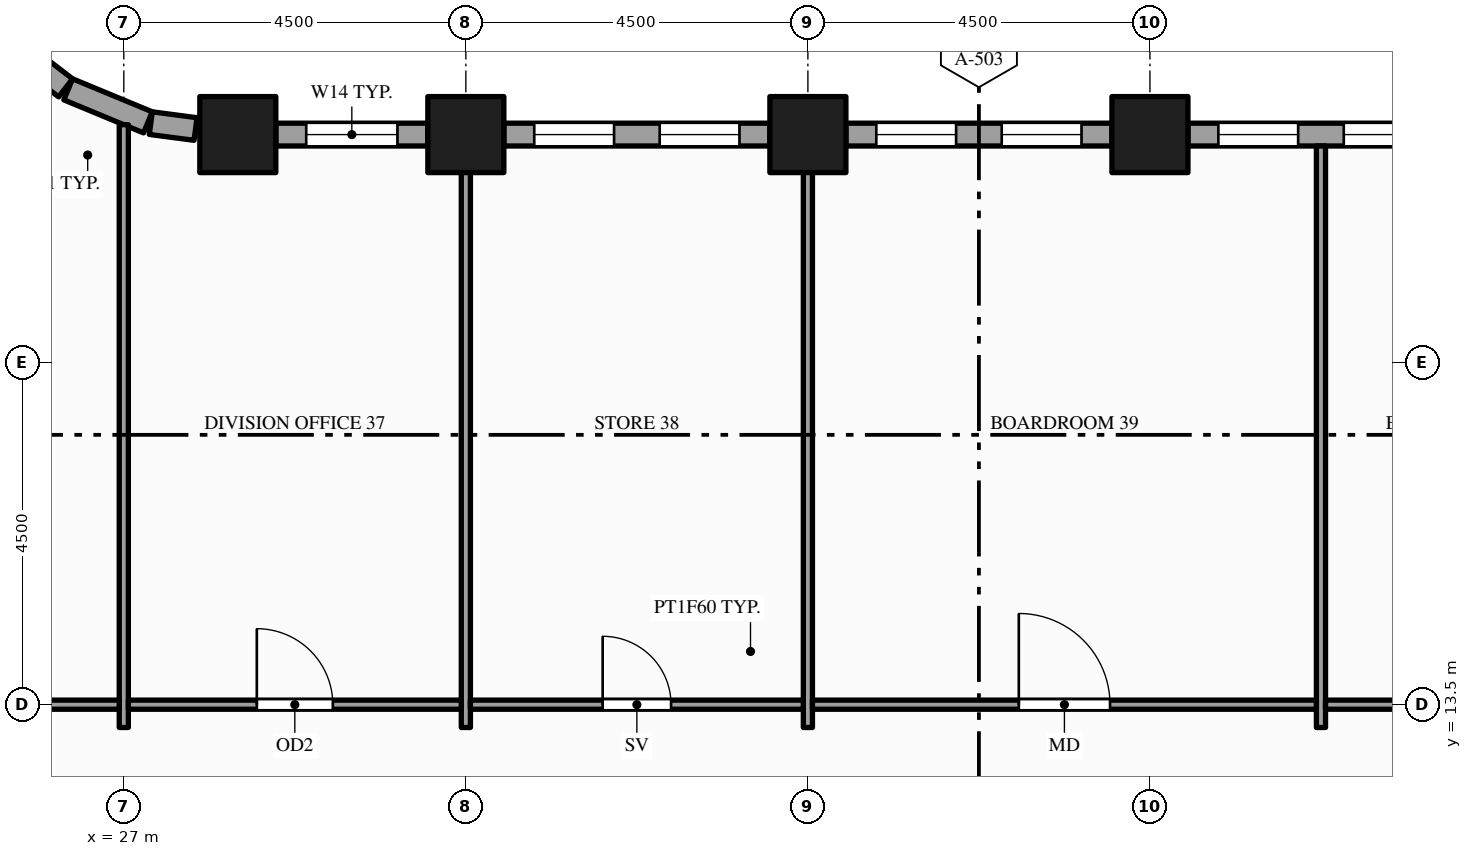
"""IFC4 building model, lengths in metres.
Left out: names, types, materials, properties, quantities, classifications, styles, units other than length and angle.
Written with IfcOpenShell. Run it as: python <this file> out.ifc"""

import sys

from ifc_helpers import new_model, si_unit, direction, frame, frame_2d, origin, origin_2d, place, context, subcontext, project, spatial, rectangle, hollow_rectangle, extrude, element, fill, save


model = new_model("IFC4")
c1 = context("Model", 3, precision=1e-05, world=origin(), true_north=direction((0.0, 1.0)))
c2 = subcontext(c1, "Body", "Model", "MODEL_VIEW")
j1 = project(units=[si_unit("LENGTHUNIT", "METRE"), si_unit("PLANEANGLEUNIT", "RADIAN")], contexts=[c1])
p1 = place(None, origin())
s1 = spatial("IfcSite", under=j1, at=p1, CompositionType="ELEMENT")
p2 = place(p1, origin())
s2 = spatial("IfcBuilding", under=s1, at=p2, CompositionType="ELEMENT")
p3 = place(p2, frame((0.0, 0.0, 83.0)))
s3 = spatial("IfcBuildingStorey", under=s2, at=p3, CompositionType="ELEMENT", Elevation=83.0)
for number, where, z_axis, x_axis in (
    (1, (28.5, 21.0, -0.15), (0.0, 0.0, 1.0), (1.0, 0.0, 0.0)),
    (2, (31.5, 21.0, -0.15), (0.0, 0.0, 1.0), (1.0, 0.0, 0.0)),
    (3, (36.0, 21.0, -0.15), (0.0, 0.0, 1.0), (1.0, 0.0, 0.0)),
    (4, (40.5, 21.0, -0.15), (0.0, 0.0, 1.0), (1.0, 0.0, 0.0)),
):
    element("IfcColumn", number, at=place(p3, frame(where, z_axis=z_axis, x_axis=x_axis)), inside=s3, PredefinedType="COLUMN", context=c2, shape_type="SweptSolid", body=[
        extrude(hollow_rectangle(XDim=1.0, YDim=1.0, WallThickness=0.05, at=origin_2d()), origin(), (0.0, 0.0, 1.0), 4.0),
    ])
p4 = place(p3, frame((44.5, 21.0, 0.0), z_axis=(0.0, 0.0, 1.0), x_axis=(-1.0, 0.0, 0.0)))
e5 = element("IfcWall", 5, at=p4, inside=s3, PredefinedType="STANDARD", context=c2, shape_type="SweptSolid", body=[
    extrude(rectangle(XDim=3.5, YDim=0.3, at=frame_2d((1.75, 0.0))), origin(), (0.0, 0.0, 1.0), 3.154),
])
p5 = place(p4, frame((0.4, 0.0, 0.9)))
e6 = element("IfcOpeningElement", 6, at=p5, cuts=e5, PredefinedType="OPENING", context=c2, shape_type="SweptSolid", body=[
    extrude(rectangle(XDim=1.05, YDim=2.0, at=frame_2d((0.525, 1.0))), frame((0.0, 0.16, 0.0), z_axis=(0.0, -1.0, 0.0), x_axis=(1.0, 0.0, 0.0)), (0.0, 0.0, 1.0), 0.32),
])
p6 = place(p4, frame((2.05, 0.0, 0.9)))
e7 = element("IfcOpeningElement", 7, at=p6, cuts=e5, PredefinedType="OPENING", context=c2, shape_type="SweptSolid", body=[
    extrude(rectangle(XDim=1.05, YDim=2.0, at=frame_2d((0.525, 1.0))), frame((0.0, 0.16, 0.0), z_axis=(0.0, -1.0, 0.0), x_axis=(1.0, 0.0, 0.0)), (0.0, 0.0, 1.0), 0.32),
])
p7 = place(p3, frame((40.0, 21.0, 0.0), z_axis=(0.0, 0.0, 1.0), x_axis=(-1.0, 0.0, 0.0)))
e8 = element("IfcWall", 8, at=p7, inside=s3, PredefinedType="STANDARD", context=c2, shape_type="SweptSolid", body=[
    extrude(rectangle(XDim=3.5, YDim=0.3, at=frame_2d((1.75, 0.0))), origin(), (0.0, 0.0, 1.0), 3.154),
])
p8 = place(p7, frame((0.4, 0.0, 0.9)))
e9 = element("IfcOpeningElement", 9, at=p8, cuts=e8, PredefinedType="OPENING", context=c2, shape_type="SweptSolid", body=[
    extrude(rectangle(XDim=1.05, YDim=2.0, at=frame_2d((0.525, 1.0))), frame((0.0, 0.16, 0.0), z_axis=(0.0, -1.0, 0.0), x_axis=(1.0, 0.0, 0.0)), (0.0, 0.0, 1.0), 0.32),
])
p9 = place(p7, frame((2.05, 0.0, 0.9)))
e10 = element("IfcOpeningElement", 10, at=p9, cuts=e8, PredefinedType="OPENING", context=c2, shape_type="SweptSolid", body=[
    extrude(rectangle(XDim=1.05, YDim=2.0, at=frame_2d((0.525, 1.0))), frame((0.0, 0.16, 0.0), z_axis=(0.0, -1.0, 0.0), x_axis=(1.0, 0.0, 0.0)), (0.0, 0.0, 1.0), 0.32),
])
p10 = place(p3, frame((35.5, 21.0, 0.0), z_axis=(0.0, 0.0, 1.0), x_axis=(-1.0, 0.0, 0.0)))
e11 = element("IfcWall", 11, at=p10, inside=s3, PredefinedType="STANDARD", context=c2, shape_type="SweptSolid", body=[
    extrude(rectangle(XDim=3.5, YDim=0.3, at=frame_2d((1.75, 0.0))), origin(), (0.0, 0.0, 1.0), 3.154),
])
p11 = place(p10, frame((0.4, 0.0, 0.9)))
e12 = element("IfcOpeningElement", 12, at=p11, cuts=e11, PredefinedType="OPENING", context=c2, shape_type="SweptSolid", body=[
    extrude(rectangle(XDim=1.05, YDim=2.0, at=frame_2d((0.525, 1.0))), frame((0.0, 0.16, 0.0), z_axis=(0.0, -1.0, 0.0), x_axis=(1.0, 0.0, 0.0)), (0.0, 0.0, 1.0), 0.32),
])
p12 = place(p10, frame((2.05, 0.0, 0.9)))
e13 = element("IfcOpeningElement", 13, at=p12, cuts=e11, PredefinedType="OPENING", context=c2, shape_type="SweptSolid", body=[
    extrude(rectangle(XDim=1.05, YDim=2.0, at=frame_2d((0.525, 1.0))), frame((0.0, 0.16, 0.0), z_axis=(0.0, -1.0, 0.0), x_axis=(1.0, 0.0, 0.0)), (0.0, 0.0, 1.0), 0.32),
])
p13 = place(p3, frame((31.0, 21.0, 0.0), z_axis=(0.0, 0.0, 1.0), x_axis=(-1.0, 0.0, 0.0)))
e14 = element("IfcWall", 14, at=p13, inside=s3, PredefinedType="STANDARD", context=c2, shape_type="SweptSolid", body=[
    extrude(rectangle(XDim=2.0, YDim=0.3, at=frame_2d((1.0, 0.0))), origin(), (0.0, 0.0, 1.0), 3.154),
])
p14 = place(p13, frame((0.4, 0.0, 0.9)))
e15 = element("IfcOpeningElement", 15, at=p14, cuts=e14, PredefinedType="OPENING", context=c2, shape_type="SweptSolid", body=[
    extrude(rectangle(XDim=1.2, YDim=2.0, at=frame_2d((0.6, 1.0))), frame((0.0, 0.16, 0.0), z_axis=(0.0, -1.0, 0.0), x_axis=(1.0, 0.0, 0.0)), (0.0, 0.0, 1.0), 0.32),
])
p15 = place(p3, frame((27.944, 21.073, 0.0), z_axis=(0.0, 0.0, 1.0), x_axis=(-0.991420685839, 0.130709692412, 0.0)))
e16 = element("IfcWall", 16, at=p15, inside=s3, PredefinedType="STANDARD", context=c2, shape_type="SweptSolid", body=[
    extrude(rectangle(XDim=0.594, YDim=0.3, at=frame_2d((0.297, 0.0))), origin(), (0.0, 0.0, 1.0), 3.154),
])
p16 = place(p3, frame((27.317, 21.161, 0.0), z_axis=(0.0, 0.0, 1.0), x_axis=(-0.923914616768, 0.382598720491, 0.0)))
e17 = element("IfcWall", 17, at=p16, inside=s3, PredefinedType="STANDARD", context=c2, shape_type="SweptSolid", body=[
    extrude(rectangle(XDim=1.135, YDim=0.3, at=frame_2d((0.568, 0.0))), origin(), (0.0, 0.0, 1.0), 2.938),
])
p17 = place(p3, frame((26.234, 21.615, 0.0), z_axis=(0.0, 0.0, 1.0), x_axis=(-0.793563062559, 0.608488016104, 0.0)))
e18 = element("IfcWall", 18, at=p17, inside=s3, PredefinedType="STANDARD", context=c2, shape_type="SweptSolid", body=[
    extrude(rectangle(XDim=0.454, YDim=0.3, at=frame_2d((0.227, 0.0))), origin(), (0.0, 0.0, 1.0), 3.154),
])
p18 = place(p3, frame((27.0, 13.2, 0.0), z_axis=(0.0, 0.0, 1.0), x_axis=(0.0, 1.0, 0.0)))
e19 = element("IfcWall", 19, at=p18, inside=s3, PredefinedType="PARTITIONING", context=c2, shape_type="SweptSolid", body=[
    extrude(rectangle(XDim=7.93, YDim=0.12, at=frame_2d((3.965, 0.0))), origin(), (0.0, 0.0, 1.0), 2.938),
])
for number, where, z_axis, x_axis in (
    (20, (31.5, 13.2, 0.0), (0.0, 0.0, 1.0), (0.0, 1.0, 0.0)),
    (21, (36.0, 13.2, 0.0), (0.0, 0.0, 1.0), (0.0, 1.0, 0.0)),
    (22, (42.75, 13.2, 0.0), (0.0, 0.0, 1.0), (0.0, 1.0, 0.0)),
):
    element("IfcWall", number, at=place(p3, frame(where, z_axis=z_axis, x_axis=x_axis)), inside=s3, PredefinedType="PARTITIONING", context=c2, shape_type="SweptSolid", body=[
        extrude(rectangle(XDim=7.65, YDim=0.12, at=frame_2d((3.825, 0.0))), origin(), (0.0, 0.0, 1.0), 2.938),
    ])
p19 = place(p3, frame((13.56, 13.5, 0.0), z_axis=(0.0, 0.0, 1.0), x_axis=(1.0, 0.0, 0.0)))
e23 = element("IfcWall", 23, at=p19, inside=s3, PredefinedType="PARTITIONING", context=c2, shape_type="SweptSolid", body=[
    extrude(rectangle(XDim=13.38, YDim=0.12, at=frame_2d((6.69, 0.0))), origin(), (0.0, 0.0, 1.0), 2.76),
])
p20 = place(p19, frame((3.54, 0.0, 0.0)))
e24 = element("IfcOpeningElement", 24, at=p20, cuts=e23, PredefinedType="OPENING", context=c2, shape_type="SweptSolid", body=[
    extrude(rectangle(XDim=1.8, YDim=2.1, at=frame_2d((0.9, 1.05))), frame((0.0, 0.07, 0.0), z_axis=(0.0, -1.0, 0.0), x_axis=(1.0, 0.0, 0.0)), (0.0, 0.0, 1.0), 0.14),
])
p21 = place(p3, frame((27.06, 13.5, 0.0), z_axis=(0.0, 0.0, 1.0), x_axis=(1.0, 0.0, 0.0)))
e25 = element("IfcWall", 25, at=p21, inside=s3, PredefinedType="PARTITIONING", context=c2, shape_type="SweptSolid", body=[
    extrude(rectangle(XDim=4.38, YDim=0.12, at=frame_2d((2.19, 0.0))), origin(), (0.0, 0.0, 1.0), 2.938),
])
p22 = place(p21, frame((1.69, 0.0, 0.0)))
e26 = element("IfcOpeningElement", 26, at=p22, cuts=e25, PredefinedType="OPENING", context=c2, shape_type="SweptSolid", body=[
    extrude(rectangle(XDim=1.0, YDim=2.1, at=frame_2d((0.5, 1.05))), frame((0.0, 0.07, 0.0), z_axis=(0.0, -1.0, 0.0), x_axis=(1.0, 0.0, 0.0)), (0.0, 0.0, 1.0), 0.14),
])
p23 = place(p3, frame((31.56, 13.5, 0.0), z_axis=(0.0, 0.0, 1.0), x_axis=(1.0, 0.0, 0.0)))
e27 = element("IfcWall", 27, at=p23, inside=s3, PredefinedType="PARTITIONING", context=c2, shape_type="SweptSolid", body=[
    extrude(rectangle(XDim=4.38, YDim=0.12, at=frame_2d((2.19, 0.0))), origin(), (0.0, 0.0, 1.0), 2.938),
])
p24 = place(p23, frame((1.74, 0.0, 0.0)))
e28 = element("IfcOpeningElement", 28, at=p24, cuts=e27, PredefinedType="OPENING", context=c2, shape_type="SweptSolid", body=[
    extrude(rectangle(XDim=0.9, YDim=2.1, at=frame_2d((0.45, 1.05))), frame((0.0, 0.07, 0.0), z_axis=(0.0, -1.0, 0.0), x_axis=(1.0, 0.0, 0.0)), (0.0, 0.0, 1.0), 0.14),
])
p25 = place(p3, frame((36.06, 13.5, 0.0), z_axis=(0.0, 0.0, 1.0), x_axis=(1.0, 0.0, 0.0)))
e29 = element("IfcWall", 29, at=p25, inside=s3, PredefinedType="PARTITIONING", context=c2, shape_type="SweptSolid", body=[
    extrude(rectangle(XDim=6.63, YDim=0.12, at=frame_2d((3.315, 0.0))), origin(), (0.0, 0.0, 1.0), 2.938),
])
p26 = place(p25, frame((2.715, 0.0, 0.0)))
e30 = element("IfcOpeningElement", 30, at=p26, cuts=e29, PredefinedType="OPENING", context=c2, shape_type="SweptSolid", body=[
    extrude(rectangle(XDim=1.2, YDim=2.1, at=frame_2d((0.6, 1.05))), frame((0.0, 0.07, 0.0), z_axis=(0.0, -1.0, 0.0), x_axis=(1.0, 0.0, 0.0)), (0.0, 0.0, 1.0), 0.14),
])
p27 = place(p3, frame((42.81, 13.5, 0.0), z_axis=(0.0, 0.0, 1.0), x_axis=(1.0, 0.0, 0.0)))
e31 = element("IfcWall", 31, at=p27, inside=s3, PredefinedType="PARTITIONING", context=c2, shape_type="SweptSolid", body=[
    extrude(rectangle(XDim=4.38, YDim=0.12, at=frame_2d((2.19, 0.0))), origin(), (0.0, 0.0, 1.0), 2.938),
])
p28 = place(p27, frame((1.59, 0.0, 0.0)))
e32 = element("IfcOpeningElement", 32, at=p28, cuts=e31, PredefinedType="OPENING", context=c2, shape_type="SweptSolid", body=[
    extrude(rectangle(XDim=1.2, YDim=2.1, at=frame_2d((0.6, 1.05))), frame((0.0, 0.07, 0.0), z_axis=(0.0, -1.0, 0.0), x_axis=(1.0, 0.0, 0.0)), (0.0, 0.0, 1.0), 0.14),
])
p29 = place(p5, origin())
e33 = element("IfcWindow", 33, at=p29, inside=s3, PartitioningType="SINGLE_PANEL", PredefinedType="WINDOW", context=c2, shape_type="SweptSolid", body=[
    extrude(rectangle(XDim=1.05, YDim=2.0, at=frame_2d((0.525, 1.0))), frame((0.0, 0.03, 0.0), z_axis=(0.0, -1.0, 0.0), x_axis=(1.0, 0.0, 0.0)), (0.0, 0.0, 1.0), 0.06),
])
fill(e6, e33)
p30 = place(p6, origin())
e34 = element("IfcWindow", 34, at=p30, inside=s3, PartitioningType="SINGLE_PANEL", PredefinedType="WINDOW", context=c2, shape_type="SweptSolid", body=[
    extrude(rectangle(XDim=1.05, YDim=2.0, at=frame_2d((0.525, 1.0))), frame((0.0, 0.03, 0.0), z_axis=(0.0, -1.0, 0.0), x_axis=(1.0, 0.0, 0.0)), (0.0, 0.0, 1.0), 0.06),
])
fill(e7, e34)
p31 = place(p8, origin())
e35 = element("IfcWindow", 35, at=p31, inside=s3, PartitioningType="SINGLE_PANEL", PredefinedType="WINDOW", context=c2, shape_type="SweptSolid", body=[
    extrude(rectangle(XDim=1.05, YDim=2.0, at=frame_2d((0.525, 1.0))), frame((0.0, 0.03, 0.0), z_axis=(0.0, -1.0, 0.0), x_axis=(1.0, 0.0, 0.0)), (0.0, 0.0, 1.0), 0.06),
])
fill(e9, e35)
p32 = place(p9, origin())
e36 = element("IfcWindow", 36, at=p32, inside=s3, PartitioningType="SINGLE_PANEL", PredefinedType="WINDOW", context=c2, shape_type="SweptSolid", body=[
    extrude(rectangle(XDim=1.05, YDim=2.0, at=frame_2d((0.525, 1.0))), frame((0.0, 0.03, 0.0), z_axis=(0.0, -1.0, 0.0), x_axis=(1.0, 0.0, 0.0)), (0.0, 0.0, 1.0), 0.06),
])
fill(e10, e36)
p33 = place(p11, origin())
e37 = element("IfcWindow", 37, at=p33, inside=s3, PartitioningType="SINGLE_PANEL", PredefinedType="WINDOW", context=c2, shape_type="SweptSolid", body=[
    extrude(rectangle(XDim=1.05, YDim=2.0, at=frame_2d((0.525, 1.0))), frame((0.0, 0.03, 0.0), z_axis=(0.0, -1.0, 0.0), x_axis=(1.0, 0.0, 0.0)), (0.0, 0.0, 1.0), 0.06),
])
fill(e12, e37)
p34 = place(p12, origin())
e38 = element("IfcWindow", 38, at=p34, inside=s3, PartitioningType="SINGLE_PANEL", PredefinedType="WINDOW", context=c2, shape_type="SweptSolid", body=[
    extrude(rectangle(XDim=1.05, YDim=2.0, at=frame_2d((0.525, 1.0))), frame((0.0, 0.03, 0.0), z_axis=(0.0, -1.0, 0.0), x_axis=(1.0, 0.0, 0.0)), (0.0, 0.0, 1.0), 0.06),
])
fill(e13, e38)
p35 = place(p14, origin())
e39 = element("IfcWindow", 39, at=p35, inside=s3, PartitioningType="SINGLE_PANEL", PredefinedType="WINDOW", context=c2, shape_type="SweptSolid", body=[
    extrude(rectangle(XDim=1.2, YDim=2.0, at=frame_2d((0.6, 1.0))), frame((0.0, 0.03, 0.0), z_axis=(0.0, -1.0, 0.0), x_axis=(1.0, 0.0, 0.0)), (0.0, 0.0, 1.0), 0.06),
])
fill(e15, e39)
p36 = place(p22, origin())
e40 = element("IfcDoor", 40, at=p36, inside=s3, OperationType="SINGLE_SWING_LEFT", PredefinedType="DOOR", context=c2, shape_type="SweptSolid", body=[
    extrude(rectangle(XDim=1.0, YDim=2.1, at=frame_2d((0.5, 1.05))), frame((0.0, 0.025, 0.0), z_axis=(0.0, -1.0, 0.0), x_axis=(1.0, 0.0, 0.0)), (0.0, 0.0, 1.0), 0.05),
])
fill(e26, e40)
p37 = place(p24, origin())
e41 = element("IfcDoor", 41, at=p37, inside=s3, OperationType="SINGLE_SWING_LEFT", PredefinedType="DOOR", context=c2, shape_type="SweptSolid", body=[
    extrude(rectangle(XDim=0.9, YDim=2.1, at=frame_2d((0.45, 1.05))), frame((0.0, 0.025, 0.0), z_axis=(0.0, -1.0, 0.0), x_axis=(1.0, 0.0, 0.0)), (0.0, 0.0, 1.0), 0.05),
])
fill(e28, e41)
p38 = place(p26, origin())
e42 = element("IfcDoor", 42, at=p38, inside=s3, OperationType="SINGLE_SWING_LEFT", PredefinedType="DOOR", context=c2, shape_type="SweptSolid", body=[
    extrude(rectangle(XDim=1.2, YDim=2.1, at=frame_2d((0.6, 1.05))), frame((0.0, 0.025, 0.0), z_axis=(0.0, -1.0, 0.0), x_axis=(1.0, 0.0, 0.0)), (0.0, 0.0, 1.0), 0.05),
])
fill(e30, e42)
save(model, sys.argv[1])
